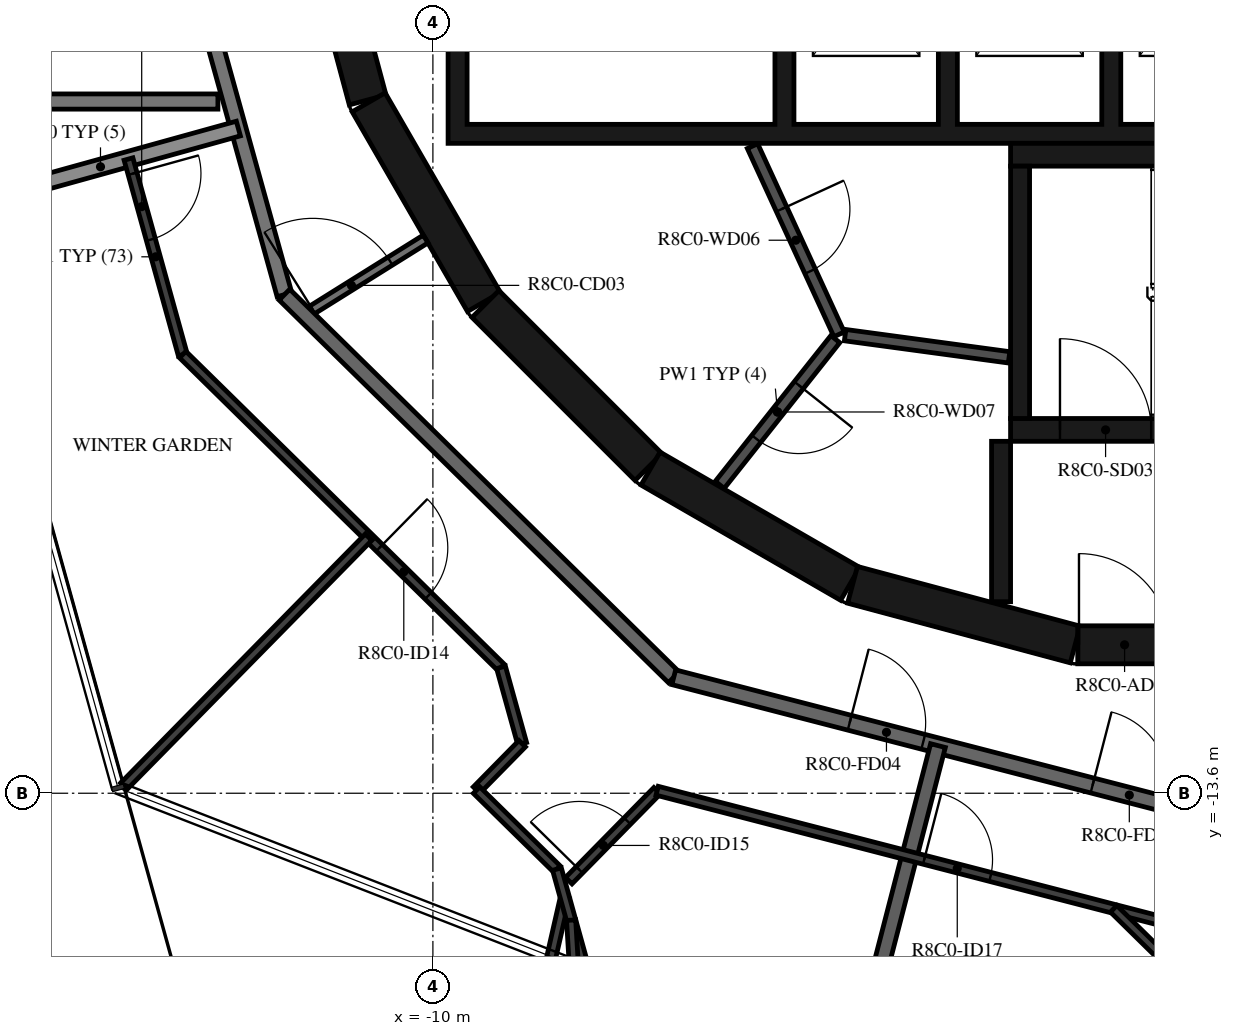
"""IFC4 building model, lengths in metres.
Left out: names, types, materials, properties, quantities, classifications, styles, units other than length and angle.
Written with IfcOpenShell. Run it as: python <this file> out.ifc"""

import sys

from ifc_helpers import new_model, si_unit, direction, frame, frame_2d, origin, place, context, subcontext, project, spatial, polyline, rectangle, outline, extrude, element, fill, save


model = new_model("IFC4")
c1 = context("Model", 3, precision=1e-05, world=origin(), true_north=direction((0.0, 1.0)))
c2 = subcontext(c1, "Body", "Model", "MODEL_VIEW")
j1 = project(units=[si_unit("LENGTHUNIT", "METRE"), si_unit("PLANEANGLEUNIT", "RADIAN")], contexts=[c1])
p1 = place(None, origin())
s1 = spatial("IfcSite", under=j1, at=p1, CompositionType="ELEMENT")
p2 = place(p1, origin())
s2 = spatial("IfcBuilding", under=s1, at=p2, CompositionType="ELEMENT")
p3 = place(p2, frame((0.0, 0.0, 319.2)))
s3 = spatial("IfcBuildingStorey", under=s2, at=p3, CompositionType="ELEMENT", Elevation=319.2)
p4 = place(p3, frame((-11.643, -1.55, 0.0), z_axis=(0.0, 0.0, 1.0), x_axis=(0.258734743916, -0.965948410781, 0.0)))
e1 = element("IfcWall", 1, at=p4, inside=s3, PredefinedType="SHEAR", context=c2, shape_type="SweptSolid", body=[
    extrude(rectangle(XDim=3.033, YDim=0.5, at=frame_2d((1.516, 0.0))), origin(), (0.0, 0.0, 1.0), 3.12),
])
p5 = place(p4, frame((1.066, 0.0, 0.0)))
e2 = element("IfcOpeningElement", 2, at=p5, cuts=e1, PredefinedType="OPENING", context=c2, shape_type="SweptSolid", body=[
    extrude(rectangle(XDim=0.9, YDim=2.1, at=frame_2d((0.45, 1.05))), frame((0.0, 0.26, 0.0), z_axis=(0.0, -1.0, 0.0), x_axis=(1.0, 0.0, 0.0)), (0.0, 0.0, 1.0), 0.52),
])
p6 = place(p3, frame((-10.845, -4.51, 0.0), z_axis=(0.0, 0.0, 1.0), x_axis=(0.500087131594, -0.865975092491, 0.0)))
e3 = element("IfcWall", 3, at=p6, inside=s3, PredefinedType="SHEAR", context=c2, shape_type="SweptSolid", body=[
    extrude(rectangle(XDim=3.033, YDim=0.5, at=frame_2d((1.516, 0.0))), origin(), (0.0, 0.0, 1.0), 3.12),
])
p7 = place(p3, frame((-9.308, -7.164, 0.0), z_axis=(0.0, 0.0, 1.0), x_axis=(0.707106781187, -0.707106781187, 0.0)))
e4 = element("IfcWall", 4, at=p7, inside=s3, PredefinedType="SHEAR", context=c2, shape_type="SweptSolid", body=[
    extrude(rectangle(XDim=3.032, YDim=0.5, at=frame_2d((1.516, 0.0))), origin(), (0.0, 0.0, 1.0), 3.12),
])
for number, where, z_axis, x_axis in (
    (5, (-7.137, -9.329, 0.0), (0.0, 0.0, 1.0), (0.866, -0.5, 0.0)),
    (6, (-4.479, -10.858, 0.0), (0.0, 0.0, 1.0), (0.966, -0.259, 0.0)),
):
    element("IfcWall", number, at=place(p3, frame(where, z_axis=z_axis, x_axis=x_axis)), inside=s3, PredefinedType="SHEAR", context=c2, shape_type="SweptSolid", body=[
        extrude(rectangle(XDim=3.033, YDim=0.5, at=frame_2d((1.516, 0.0))), origin(), (0.0, 0.0, 1.0), 3.12),
    ])
p8 = place(p3, frame((-1.516, -11.647, 0.0), z_axis=(0.0, 0.0, 1.0), x_axis=(1.0, 0.0, 0.0)))
e7 = element("IfcWall", 7, at=p8, inside=s3, PredefinedType="SHEAR", context=c2, shape_type="SweptSolid", body=[
    extrude(rectangle(XDim=3.033, YDim=0.5, at=frame_2d((1.516, 0.0))), origin(), (0.0, 0.0, 1.0), 3.12),
])
p9 = place(p8, frame((0.016, 0.0, 0.0)))
e8 = element("IfcOpeningElement", 8, at=p9, cuts=e7, PredefinedType="OPENING", context=c2, shape_type="SweptSolid", body=[
    extrude(rectangle(XDim=1.2, YDim=2.1, at=frame_2d((0.6, 1.05))), frame((0.0, 0.26, 0.0), z_axis=(0.0, -1.0, 0.0), x_axis=(1.0, 0.0, 0.0)), (0.0, 0.0, 1.0), 0.52),
])
p10 = place(p3, frame((-2.275, -8.67, 0.0), z_axis=(0.0, 0.0, 1.0), x_axis=(0.0, 1.0, 0.0)))
e9 = element("IfcWall", 9, at=p10, inside=s3, PredefinedType="SHEAR", context=c2, shape_type="SweptSolid", body=[
    extrude(rectangle(XDim=3.32, YDim=0.25, at=frame_2d((1.66, 0.0))), origin(), (0.0, 0.0, 1.0), 3.12),
])
p11 = place(p3, frame((-2.4, -5.2, 0.0), z_axis=(0.0, 0.0, 1.0), x_axis=(1.0, 0.0, 0.0)))
e10 = element("IfcWall", 10, at=p11, inside=s3, PredefinedType="SHEAR", context=c2, shape_type="SweptSolid", body=[
    extrude(rectangle(XDim=7.05, YDim=0.3, at=frame_2d((3.525, 0.0))), origin(), (0.0, 0.0, 1.0), 3.12),
])
p12 = place(p3, frame((-2.4, -8.82, 0.0), z_axis=(0.0, 0.0, 1.0), x_axis=(1.0, 0.0, 0.0)))
e11 = element("IfcWall", 11, at=p12, inside=s3, PredefinedType="SHEAR", context=c2, shape_type="SweptSolid", body=[
    extrude(rectangle(XDim=2.5, YDim=0.3, at=frame_2d((1.25, 0.0))), origin(), (0.0, 0.0, 1.0), 3.12),
])
p13 = place(p12, frame((0.65, 0.0, 0.0)))
e12 = element("IfcOpeningElement", 12, at=p13, cuts=e11, PredefinedType="OPENING", context=c2, shape_type="SweptSolid", body=[
    extrude(rectangle(XDim=1.2, YDim=2.1, at=frame_2d((0.6, 1.05))), frame((0.0, 0.16, 0.0), z_axis=(0.0, -1.0, 0.0), x_axis=(1.0, 0.0, 0.0)), (0.0, 0.0, 1.0), 0.32),
])
p14 = place(p3, frame((-2.525, -8.97, 0.0), z_axis=(0.0, 0.0, 1.0), x_axis=(0.0, -1.0, 0.0)))
e13 = element("IfcWall", 13, at=p14, inside=s3, PredefinedType="SHEAR", context=c2, shape_type="SweptSolid", body=[
    extrude(rectangle(XDim=2.11, YDim=0.25, at=frame_2d((1.055, 0.0))), origin(), (0.0, 0.0, 1.0), 3.12),
])
p15 = place(p3, origin())
e14 = element("IfcWall", 14, at=p15, inside=s3, PredefinedType="SHEAR", context=c2, shape_type="SweptSolid", body=[
    extrude(outline(polyline([(9.8, -5.05), (9.8, -4.8), (9.8, -1.9), (9.55, -1.9), (9.55, -4.8), (7.65, -4.8), (7.65, -1.9), (7.4, -1.9), (7.4, -4.8), (5.5, -4.8), (5.5, -1.9), (5.25, -1.9), (5.25, -4.8), (3.35, -4.8), (3.35, -1.9), (3.1, -1.9), (3.1, -4.8), (1.2, -4.8), (1.2, -1.9), (0.95, -1.9), (0.95, -4.8), (-0.95, -4.8), (-0.95, -1.9), (-1.2, -1.9), (-1.2, -4.8), (-3.1, -4.8), (-3.1, -1.9), (-3.35, -1.9), (-3.35, -4.8), (-5.25, -4.8), (-5.25, -1.9), (-5.5, -1.9), (-5.5, -4.8), (-9.55, -4.8), (-9.55, -1.9), (-9.8, -1.9), (-9.8, -4.8), (-9.8, -5.05), (9.8, -5.05)])), origin(), (0.0, 0.0, 1.0), 3.12),
])
p16 = place(p3, frame((-5.795, -5.086, 0.0), z_axis=(0.0, 0.0, 1.0), x_axis=(0.417887867606, -0.908498613157, 0.0)))
e15 = element("IfcWall", 15, at=p16, inside=s3, PredefinedType="PARTITIONING", context=c2, shape_type="SweptSolid", body=[
    extrude(rectangle(XDim=2.726, YDim=0.15, at=frame_2d((1.363, 0.0))), origin(), (0.0, 0.0, 1.0), 3.12),
])
p17 = place(p16, frame((0.913, 0.0, 0.0)))
e16 = element("IfcOpeningElement", 16, at=p17, cuts=e15, PredefinedType="OPENING", context=c2, shape_type="SweptSolid", body=[
    extrude(rectangle(XDim=0.9, YDim=2.1, at=frame_2d((0.45, 1.05))), frame((0.0, 0.085, 0.0), z_axis=(0.0, -1.0, 0.0), x_axis=(1.0, 0.0, 0.0)), (0.0, 0.0, 1.0), 0.17),
])
p18 = place(p3, frame((-4.706, -7.625, 0.0), z_axis=(0.0, 0.0, 1.0), x_axis=(-0.621392599334, -0.783499353856, 0.0)))
e17 = element("IfcWall", 17, at=p18, inside=s3, PredefinedType="PARTITIONING", context=c2, shape_type="SweptSolid", body=[
    extrude(rectangle(XDim=2.447, YDim=0.15, at=frame_2d((1.224, 0.0))), origin(), (0.0, 0.0, 1.0), 3.12),
])
p19 = place(p18, frame((0.774, 0.0, 0.0)))
e18 = element("IfcOpeningElement", 18, at=p19, cuts=e17, PredefinedType="OPENING", context=c2, shape_type="SweptSolid", body=[
    extrude(rectangle(XDim=0.9, YDim=2.1, at=frame_2d((0.45, 1.05))), frame((0.0, 0.085, 0.0), z_axis=(0.0, -1.0, 0.0), x_axis=(1.0, 0.0, 0.0)), (0.0, 0.0, 1.0), 0.17),
])
p20 = place(p3, frame((-2.42, -7.865, 0.0), z_axis=(0.0, 0.0, 1.0), x_axis=(-0.990972299108, 0.134066783362, 0.0)))
e19 = element("IfcWall", 19, at=p20, inside=s3, PredefinedType="PARTITIONING", context=c2, shape_type="SweptSolid", body=[
    extrude(rectangle(XDim=2.176, YDim=0.15, at=frame_2d((1.088, 0.0))), origin(), (0.0, 0.0, 1.0), 3.12),
])
p21 = place(p3, frame((-11.687, -7.303, 0.0), z_axis=(0.0, 0.0, 1.0), x_axis=(0.848064094072, 0.529893661357, 0.0)))
e20 = element("IfcWall", 20, at=p21, inside=s3, PredefinedType="PARTITIONING", context=c2, shape_type="SweptSolid", body=[
    extrude(rectangle(XDim=1.876, YDim=0.12, at=frame_2d((0.938, 0.0))), origin(), (0.0, 0.0, 1.0), 3.12),
])
p22 = place(p21, frame((0.125, 0.0, 0.0)))
e21 = element("IfcOpeningElement", 21, at=p22, cuts=e20, PredefinedType="OPENING", context=c2, shape_type="SweptSolid", body=[
    extrude(rectangle(XDim=1.2, YDim=2.1, at=frame_2d((0.6, 1.05))), frame((0.0, 0.07, 0.0), z_axis=(0.0, -1.0, 0.0), x_axis=(1.0, 0.0, 0.0)), (0.0, 0.0, 1.0), 0.14),
])
p23 = place(p3, frame((-13.872, -0.121, 0.0), z_axis=(0.0, 0.0, 1.0), x_axis=(0.267254575108, -0.963625960674, 0.0)))
e22 = element("IfcWall", 22, at=p23, inside=s3, PredefinedType="STANDARD", context=c2, shape_type="SweptSolid", body=[
    extrude(rectangle(XDim=7.181, YDim=0.2, at=frame_2d((3.591, 0.0))), origin(), (0.0, 0.0, 1.0), 3.12),
])
p24 = place(p3, frame((-11.953, -7.041, 0.0), z_axis=(0.0, 0.0, 1.0), x_axis=(0.713250549143, -0.70090916255, 0.0)))
e23 = element("IfcWall", 23, at=p24, inside=s3, PredefinedType="STANDARD", context=c2, shape_type="SweptSolid", body=[
    extrude(rectangle(XDim=7.181, YDim=0.2, at=frame_2d((3.59, 0.0))), origin(), (0.0, 0.0, 1.0), 3.12),
])
p25 = place(p3, frame((-6.831, -12.074, 0.0), z_axis=(0.0, 0.0, 1.0), x_axis=(0.968144780225, -0.250391063186, 0.0)))
e24 = element("IfcWall", 24, at=p25, inside=s3, PredefinedType="STANDARD", context=c2, shape_type="SweptSolid", body=[
    extrude(rectangle(XDim=7.181, YDim=0.2, at=frame_2d((3.591, 0.0))), origin(), (0.0, 0.0, 1.0), 3.12),
])
p26 = place(p25, frame((2.39, 0.0, 0.0)))
e25 = element("IfcOpeningElement", 25, at=p26, cuts=e24, PredefinedType="OPENING", context=c2, shape_type="SweptSolid", body=[
    extrude(rectangle(XDim=1.0, YDim=2.1, at=frame_2d((0.5, 1.05))), frame((0.0, 0.11, 0.0), z_axis=(0.0, -1.0, 0.0), x_axis=(1.0, 0.0, 0.0)), (0.0, 0.0, 1.0), 0.22),
])
p27 = place(p25, frame((5.69, 0.0, 0.0)))
e26 = element("IfcOpeningElement", 26, at=p27, cuts=e24, PredefinedType="OPENING", context=c2, shape_type="SweptSolid", body=[
    extrude(rectangle(XDim=1.0, YDim=2.1, at=frame_2d((0.5, 1.05))), frame((0.0, 0.11, 0.0), z_axis=(0.0, -1.0, 0.0), x_axis=(1.0, 0.0, 0.0)), (0.0, 0.0, 1.0), 0.22),
])
p28 = place(p3, frame((-16.564, -4.5, 0.0), z_axis=(0.0, 0.0, 1.0), x_axis=(1.0, 0.0, 0.0)))
e27 = element("IfcWall", 27, at=p28, inside=s3, PredefinedType="STANDARD", context=c2, shape_type="SweptSolid", body=[
    extrude(rectangle(XDim=3.736, YDim=0.2, at=frame_2d((1.868, 0.0))), origin(), (0.0, 0.0, 1.0), 3.12),
])
p29 = place(p3, frame((-16.187, -5.862, 0.0), z_axis=(0.0, 0.0, 1.0), x_axis=(0.963631166683, 0.267235803358, 0.0)))
e28 = element("IfcWall", 28, at=p29, inside=s3, PredefinedType="STANDARD", context=c2, shape_type="SweptSolid", body=[
    extrude(rectangle(XDim=3.765, YDim=0.2, at=frame_2d((1.882, 0.0))), origin(), (0.0, 0.0, 1.0), 2.73),
])
p30 = place(p3, frame((-4.214, -16.295, 0.0), z_axis=(0.0, 0.0, 1.0), x_axis=(0.250428810918, 0.968135016752, 0.0)))
e29 = element("IfcWall", 29, at=p30, inside=s3, PredefinedType="STANDARD", context=c2, shape_type="SweptSolid", body=[
    extrude(rectangle(XDim=3.432, YDim=0.2, at=frame_2d((1.716, 0.0))), origin(), (0.0, 0.0, 1.0), 3.12),
])
p31 = place(p3, frame((-14.005, -5.256, 0.0), z_axis=(0.0, 0.0, 1.0), x_axis=(0.267200500487, -0.963640956238, 0.0)))
e30 = element("IfcWall", 30, at=p31, inside=s3, PredefinedType="PARTITIONING", context=c2, shape_type="SweptSolid", body=[
    extrude(rectangle(XDim=2.67, YDim=0.12, at=frame_2d((1.335, 0.0))), origin(), (0.0, 0.0, 1.0), 3.12),
])
p32 = place(p31, frame((0.2, 0.0, 0.0)))
e31 = element("IfcOpeningElement", 31, at=p32, cuts=e30, PredefinedType="OPENING", context=c2, shape_type="SweptSolid", body=[
    extrude(rectangle(XDim=0.9, YDim=2.1, at=frame_2d((0.45, 1.05))), frame((0.0, 0.07, 0.0), z_axis=(0.0, -1.0, 0.0), x_axis=(1.0, 0.0, 0.0)), (0.0, 0.0, 1.0), 0.14),
])
p33 = place(p3, frame((-13.291, -7.829, 0.0), z_axis=(0.0, 0.0, 1.0), x_axis=(0.713255094589, -0.700904537039, 0.0)))
e32 = element("IfcWall", 32, at=p33, inside=s3, PredefinedType="PARTITIONING", context=c2, shape_type="SweptSolid", body=[
    extrude(rectangle(XDim=5.871, YDim=0.12, at=frame_2d((2.936, 0.0))), origin(), (0.0, 0.0, 1.0), 3.12),
])
p34 = place(p33, frame((3.627, 0.0, 0.0)))
e33 = element("IfcOpeningElement", 33, at=p34, cuts=e32, PredefinedType="OPENING", context=c2, shape_type="SweptSolid", body=[
    extrude(rectangle(XDim=0.9, YDim=2.1, at=frame_2d((0.45, 1.05))), frame((0.0, 0.07, 0.0), z_axis=(0.0, -1.0, 0.0), x_axis=(1.0, 0.0, 0.0)), (0.0, 0.0, 1.0), 0.14),
])
p35 = place(p3, frame((-9.104, -11.944, 0.0), z_axis=(0.0, 0.0, 1.0), x_axis=(0.267317596771, -0.963608479859, 0.0)))
e34 = element("IfcWall", 34, at=p35, inside=s3, PredefinedType="PARTITIONING", context=c2, shape_type="SweptSolid", body=[
    extrude(rectangle(XDim=1.042, YDim=0.12, at=frame_2d((0.521, 0.0))), origin(), (0.0, 0.0, 1.0), 3.12),
])
p36 = place(p3, frame((-8.825, -12.948, 0.0), z_axis=(0.0, 0.0, 1.0), x_axis=(-0.700949034431, -0.713211364976, 0.0)))
e35 = element("IfcWall", 35, at=p36, inside=s3, PredefinedType="PARTITIONING", context=c2, shape_type="SweptSolid", body=[
    extrude(rectangle(XDim=0.856, YDim=0.12, at=frame_2d((0.428, 0.0))), origin(), (0.0, 0.0, 1.0), 3.12),
])
p37 = place(p3, frame((-9.425, -13.559, 0.0), z_axis=(0.0, 0.0, 1.0), x_axis=(0.713255540994, -0.700904082768, 0.0)))
e36 = element("IfcWall", 36, at=p37, inside=s3, PredefinedType="PARTITIONING", context=c2, shape_type="SweptSolid", body=[
    extrude(rectangle(XDim=1.482, YDim=0.12, at=frame_2d((0.741, 0.0))), origin(), (0.0, 0.0, 1.0), 3.12),
])
p38 = place(p3, frame((-8.213, -14.75, 0.0), z_axis=(0.0, 0.0, 1.0), x_axis=(0.700899260151, 0.713260280066, 0.0)))
e37 = element("IfcWall", 37, at=p38, inside=s3, PredefinedType="PARTITIONING", context=c2, shape_type="SweptSolid", body=[
    extrude(rectangle(XDim=1.659, YDim=0.12, at=frame_2d((0.83, 0.0))), origin(), (0.0, 0.0, 1.0), 3.12),
])
p39 = place(p38, frame((0.2, 0.0, 0.0)))
e38 = element("IfcOpeningElement", 38, at=p39, cuts=e37, PredefinedType="OPENING", context=c2, shape_type="SweptSolid", body=[
    extrude(rectangle(XDim=0.9, YDim=2.1, at=frame_2d((0.45, 1.05))), frame((0.0, 0.07, 0.0), z_axis=(0.0, -1.0, 0.0), x_axis=(1.0, 0.0, 0.0)), (0.0, 0.0, 1.0), 0.14),
])
p40 = place(p3, frame((-7.05, -13.567, 0.0), z_axis=(0.0, 0.0, 1.0), x_axis=(0.968142373865, -0.250400367264, 0.0)))
e39 = element("IfcWall", 39, at=p40, inside=s3, PredefinedType="PARTITIONING", context=c2, shape_type="SweptSolid", body=[
    extrude(rectangle(XDim=7.421, YDim=0.12, at=frame_2d((3.71, 0.0))), origin(), (0.0, 0.0, 1.0), 3.12),
])
p41 = place(p40, frame((3.628, 0.0, 0.0)))
e40 = element("IfcOpeningElement", 40, at=p41, cuts=e39, PredefinedType="OPENING", context=c2, shape_type="SweptSolid", body=[
    extrude(rectangle(XDim=0.9, YDim=2.1, at=frame_2d((0.45, 1.05))), frame((0.0, 0.07, 0.0), z_axis=(0.0, -1.0, 0.0), x_axis=(1.0, 0.0, 0.0)), (0.0, 0.0, 1.0), 0.14),
])
p42 = place(p3, frame((-14.066, -13.508, 0.0), z_axis=(0.0, 0.0, 1.0), x_axis=(0.700941781432, 0.7132184932, 0.0)))
e41 = element("IfcWall", 41, at=p42, inside=s3, PredefinedType="PARTITIONING", context=c2, shape_type="SweptSolid", body=[
    extrude(rectangle(XDim=4.594, YDim=0.12, at=frame_2d((2.297, 0.0))), origin(), (0.0, 0.0, 1.0), 3.12),
])
p43 = place(p3, frame((-10.187, -23.406, 0.0), z_axis=(0.0, 0.0, 1.0), x_axis=(0.222411648081, 0.974952849526, 0.0)))
e42 = element("IfcWall", 42, at=p43, inside=s3, PredefinedType="PARTITIONING", context=c2, shape_type="SweptSolid", body=[
    extrude(rectangle(XDim=8.649, YDim=0.12, at=frame_2d((4.324, 0.0))), origin(), (0.0, 0.0, 1.0), 3.12),
])
p44 = place(p43, frame((0.6, 0.0, 0.0)))
e43 = element("IfcOpeningElement", 43, at=p44, cuts=e42, PredefinedType="OPENING", context=c2, shape_type="SweptSolid", body=[
    extrude(rectangle(XDim=0.9, YDim=2.1, at=frame_2d((0.45, 1.05))), frame((0.0, 0.07, 0.0), z_axis=(0.0, -1.0, 0.0), x_axis=(1.0, 0.0, 0.0)), (0.0, 0.0, 1.0), 0.14),
])
p45 = place(p3, frame((-7.368, -18.202, 0.0), z_axis=(0.0, 0.0, 1.0), x_axis=(-0.267246564077, 0.963628182438, 0.0)))
e44 = element("IfcWall", 44, at=p45, inside=s3, PredefinedType="PARTITIONING", context=c2, shape_type="SweptSolid", body=[
    extrude(rectangle(XDim=3.74, YDim=0.12, at=frame_2d((1.87, 0.0))), origin(), (0.0, 0.0, 1.0), 3.12),
])
p46 = place(p3, frame((-7.587, -25.148, 0.0), z_axis=(0.0, 0.0, 1.0), x_axis=(-0.060023558623, 0.99819696073, 0.0)))
e45 = element("IfcWall", 45, at=p46, inside=s3, PredefinedType="PARTITIONING", context=c2, shape_type="SweptSolid", body=[
    extrude(rectangle(XDim=9.896, YDim=0.12, at=frame_2d((4.948, 0.0))), origin(), (0.0, 0.0, 1.0), 3.12),
])
p47 = place(p46, frame((1.8, 0.0, 0.0)))
e46 = element("IfcOpeningElement", 46, at=p47, cuts=e45, PredefinedType="OPENING", context=c2, shape_type="SweptSolid", body=[
    extrude(rectangle(XDim=0.8, YDim=2.1, at=frame_2d((0.4, 1.05))), frame((0.0, 0.07, 0.0), z_axis=(0.0, -1.0, 0.0), x_axis=(1.0, 0.0, 0.0)), (0.0, 0.0, 1.0), 0.14),
])
p48 = place(p3, frame((-1.842, -20.086, 0.0), z_axis=(0.0, 0.0, 1.0), x_axis=(0.700919640212, 0.713240252625, 0.0)))
e47 = element("IfcWall", 47, at=p48, inside=s3, PredefinedType="PARTITIONING", context=c2, shape_type="SweptSolid", body=[
    extrude(rectangle(XDim=7.926, YDim=0.12, at=frame_2d((3.963, 0.0))), origin(), (0.0, 0.0, 1.0), 3.12),
])
p49 = place(p3, frame((1.032, -17.161, 0.0), z_axis=(0.0, 0.0, 1.0), x_axis=(-0.713201827259, 0.700958738867, 0.0)))
e48 = element("IfcWall", 48, at=p49, inside=s3, PredefinedType="PARTITIONING", context=c2, shape_type="SweptSolid", body=[
    extrude(rectangle(XDim=2.911, YDim=0.12, at=frame_2d((1.456, 0.0))), origin(), (0.0, 0.0, 1.0), 3.12),
])
p50 = place(p13, origin())
e49 = element("IfcDoor", 49, at=p50, inside=s3, OperationType="SINGLE_SWING_LEFT", PredefinedType="DOOR", context=c2, shape_type="SweptSolid", body=[
    extrude(rectangle(XDim=1.2, YDim=2.1, at=frame_2d((0.6, 1.05))), frame((0.0, 0.025, 0.0), z_axis=(0.0, -1.0, 0.0), x_axis=(1.0, 0.0, 0.0)), (0.0, 0.0, 1.0), 0.05),
])
fill(e12, e49)
p51 = place(p9, origin())
e50 = element("IfcDoor", 50, at=p51, inside=s3, OperationType="SINGLE_SWING_RIGHT", PredefinedType="DOOR", context=c2, shape_type="SweptSolid", body=[
    extrude(rectangle(XDim=1.2, YDim=2.1, at=frame_2d((0.6, 1.05))), frame((0.0, 0.025, 0.0), z_axis=(0.0, -1.0, 0.0), x_axis=(1.0, 0.0, 0.0)), (0.0, 0.0, 1.0), 0.05),
])
fill(e8, e50)
p52 = place(p17, origin())
e51 = element("IfcDoor", 51, at=p52, inside=s3, OperationType="SINGLE_SWING_RIGHT", PredefinedType="DOOR", context=c2, shape_type="SweptSolid", body=[
    extrude(rectangle(XDim=0.9, YDim=2.1, at=frame_2d((0.45, 1.05))), frame((0.0, 0.025, 0.0), z_axis=(0.0, -1.0, 0.0), x_axis=(1.0, 0.0, 0.0)), (0.0, 0.0, 1.0), 0.05),
])
fill(e16, e51)
p53 = place(p19, origin())
e52 = element("IfcDoor", 52, at=p53, inside=s3, OperationType="SINGLE_SWING_LEFT", PredefinedType="DOOR", context=c2, shape_type="SweptSolid", body=[
    extrude(rectangle(XDim=0.9, YDim=2.1, at=frame_2d((0.45, 1.05))), frame((0.0, 0.025, 0.0), z_axis=(0.0, -1.0, 0.0), x_axis=(1.0, 0.0, 0.0)), (0.0, 0.0, 1.0), 0.05),
])
fill(e18, e52)
p54 = place(p26, origin())
e53 = element("IfcDoor", 53, at=p54, inside=s3, OperationType="SINGLE_SWING_RIGHT", PredefinedType="DOOR", context=c2, shape_type="SweptSolid", body=[
    extrude(rectangle(XDim=1.0, YDim=2.1, at=frame_2d((0.5, 1.05))), frame((0.0, 0.025, 0.0), z_axis=(0.0, -1.0, 0.0), x_axis=(1.0, 0.0, 0.0)), (0.0, 0.0, 1.0), 0.05),
])
fill(e25, e53)
p55 = place(p32, origin())
e54 = element("IfcDoor", 54, at=p55, inside=s3, OperationType="SINGLE_SWING_RIGHT", PredefinedType="DOOR", context=c2, shape_type="SweptSolid", body=[
    extrude(rectangle(XDim=0.9, YDim=2.1, at=frame_2d((0.45, 1.05))), frame((0.0, 0.025, 0.0), z_axis=(0.0, -1.0, 0.0), x_axis=(1.0, 0.0, 0.0)), (0.0, 0.0, 1.0), 0.05),
])
fill(e31, e54)
p56 = place(p34, origin())
e55 = element("IfcDoor", 55, at=p56, inside=s3, OperationType="SINGLE_SWING_RIGHT", PredefinedType="DOOR", context=c2, shape_type="SweptSolid", body=[
    extrude(rectangle(XDim=0.9, YDim=2.1, at=frame_2d((0.45, 1.05))), frame((0.0, 0.025, 0.0), z_axis=(0.0, -1.0, 0.0), x_axis=(1.0, 0.0, 0.0)), (0.0, 0.0, 1.0), 0.05),
])
fill(e33, e55)
p57 = place(p39, origin())
e56 = element("IfcDoor", 56, at=p57, inside=s3, OperationType="SINGLE_SWING_LEFT", PredefinedType="DOOR", context=c2, shape_type="SweptSolid", body=[
    extrude(rectangle(XDim=0.9, YDim=2.1, at=frame_2d((0.45, 1.05))), frame((0.0, 0.025, 0.0), z_axis=(0.0, -1.0, 0.0), x_axis=(1.0, 0.0, 0.0)), (0.0, 0.0, 1.0), 0.05),
])
fill(e38, e56)
p58 = place(p27, origin())
e57 = element("IfcDoor", 57, at=p58, inside=s3, OperationType="SINGLE_SWING_LEFT", PredefinedType="DOOR", context=c2, shape_type="SweptSolid", body=[
    extrude(rectangle(XDim=1.0, YDim=2.1, at=frame_2d((0.5, 1.05))), frame((0.0, 0.025, 0.0), z_axis=(0.0, -1.0, 0.0), x_axis=(1.0, 0.0, 0.0)), (0.0, 0.0, 1.0), 0.05),
])
fill(e26, e57)
p59 = place(p41, origin())
e58 = element("IfcDoor", 58, at=p59, inside=s3, OperationType="SINGLE_SWING_RIGHT", PredefinedType="DOOR", context=c2, shape_type="SweptSolid", body=[
    extrude(rectangle(XDim=0.9, YDim=2.1, at=frame_2d((0.45, 1.05))), frame((0.0, 0.025, 0.0), z_axis=(0.0, -1.0, 0.0), x_axis=(1.0, 0.0, 0.0)), (0.0, 0.0, 1.0), 0.05),
])
fill(e40, e58)
p60 = place(p22, origin())
e59 = element("IfcDoor", 59, at=p60, inside=s3, OperationType="DOUBLE_DOOR_SINGLE_SWING", PredefinedType="DOOR", context=c2, shape_type="SweptSolid", body=[
    extrude(rectangle(XDim=1.2, YDim=2.1, at=frame_2d((0.6, 1.05))), frame((0.0, 0.025, 0.0), z_axis=(0.0, -1.0, 0.0), x_axis=(1.0, 0.0, 0.0)), (0.0, 0.0, 1.0), 0.05),
])
fill(e21, e59)
save(model, sys.argv[1])
